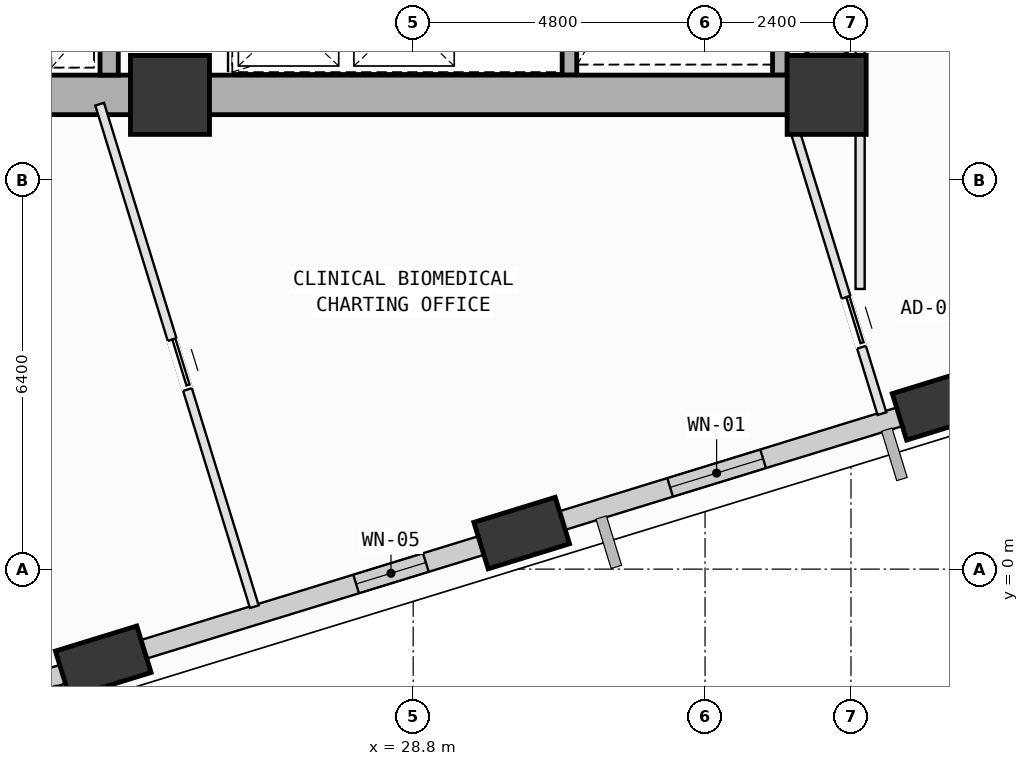
"""IFC4 building model, lengths in metres.
Left out: names, types, materials, properties, quantities, classifications, styles, units other than length and angle.
Written with IfcOpenShell. Run it as: python <this file> out.ifc"""

import sys

from ifc_helpers import new_model, si_unit, direction, frame, frame_2d, origin, origin_2d, place, context, subcontext, project, spatial, rectangle, extrude, element, fill, save


model = new_model("IFC4")
c1 = context("Model", 3, precision=1e-05, world=origin(), true_north=direction((0.0, 1.0)))
c2 = subcontext(c1, "Body", "Model", "MODEL_VIEW")
j1 = project(units=[si_unit("LENGTHUNIT", "METRE"), si_unit("PLANEANGLEUNIT", "RADIAN")], contexts=[c1])
p1 = place(None, origin())
s1 = spatial("IfcSite", under=j1, at=p1, CompositionType="ELEMENT")
p2 = place(p1, origin())
s2 = spatial("IfcBuilding", under=s1, at=p2, CompositionType="ELEMENT")
p3 = place(p2, frame((0.0, 0.0, 96.4)))
s3 = spatial("IfcBuildingStorey", under=s2, at=p3, CompositionType="ELEMENT", Elevation=96.4)
for number, where, z_axis, x_axis in (
    (1, (24.8, 7.8, 0.0), (0.0, 0.0, 1.0), (1.0, 0.0, 0.0)),
    (2, (35.6, 7.8, 0.0), (0.0, 0.0, 1.0), (1.0, 0.0, 0.0)),
):
    element("IfcColumn", number, at=place(p3, frame(where, z_axis=z_axis, x_axis=x_axis)), inside=s3, PredefinedType="COLUMN", context=c2, shape_type="SweptSolid", body=[
        extrude(rectangle(XDim=1.3, YDim=1.3, at=origin_2d()), origin(), (0.0, 0.0, 1.0), 4.0),
    ])
p4 = place(p3, frame((23.703, -1.524, 0.002), z_axis=(0.108738529907, -0.039866748967, 0.993270645112), x_axis=(0.054793722335, 0.997916793661, 0.034054675485)))
e3 = element("IfcColumn", 3, at=p4, inside=s3, PredefinedType="COLUMN", context=c2, shape_type="SweptSolid", body=[
    extrude(rectangle(XDim=1.4, YDim=0.8, at=origin_2d()), origin(), (0.0, 0.0, 1.0), 4.023),
])
p5 = place(p3, frame((30.585, 0.593, 0.002), z_axis=(0.099924278098, -0.011609207492, 0.994927316415), x_axis=(-0.180291978326, 0.983168277463, 0.029579397236)))
e4 = element("IfcColumn", 4, at=p5, inside=s3, PredefinedType="COLUMN", context=c2, shape_type="SweptSolid", body=[
    extrude(rectangle(XDim=1.4, YDim=0.8, at=origin_2d()), origin(), (0.0, 0.0, 1.0), 4.017),
])
p6 = place(p3, frame((37.466, 2.71, 0.002), z_axis=(0.091060551316, 0.016727890188, 0.995704852697), x_axis=(-0.460649221978, 0.887164683089, 0.027223507694)))
e5 = element("IfcColumn", 5, at=p6, inside=s3, PredefinedType="COLUMN", context=c2, shape_type="SweptSolid", body=[
    extrude(rectangle(XDim=1.4, YDim=0.8, at=origin_2d()), origin(), (0.0, 0.0, 1.0), 4.014),
])
p7 = place(p3, frame((23.426, -1.609, 0.0), z_axis=(0.0, 0.0, 1.0), x_axis=(-0.955789110758, -0.294053015213, 0.0)))
e6 = element("IfcWall", 6, at=p7, inside=s3, PredefinedType="SOLIDWALL", context=c2, shape_type="SweptSolid", body=[
    extrude(rectangle(XDim=6.27, YDim=0.32, at=frame_2d((3.135, 0.0))), origin(), (0.0, 0.0, 1.0), 3.165),
])
p8 = place(p7, frame((2.229, 0.0, 0.75)))
e7 = element("IfcOpeningElement", 7, at=p8, cuts=e6, PredefinedType="OPENING", context=c2, shape_type="SweptSolid", body=[
    extrude(rectangle(XDim=1.8, YDim=2.05, at=frame_2d((0.9, 1.025))), frame((0.0, 0.17, 0.0), z_axis=(0.0, -1.0, 0.0), x_axis=(1.0, 0.0, 0.0)), (0.0, 0.0, 1.0), 0.34),
])
p9 = place(p3, frame((30.294, 0.504, 0.0), z_axis=(0.0, 0.0, 1.0), x_axis=(-0.955799327756, -0.294019803859, 0.0)))
e8 = element("IfcWall", 8, at=p9, inside=s3, PredefinedType="SOLIDWALL", context=c2, shape_type="SweptSolid", body=[
    extrude(rectangle(XDim=6.234, YDim=0.32, at=frame_2d((3.117, 0.0))), origin(), (0.0, 0.0, 1.0), 3.165),
])
p10 = place(p9, frame((1.344, 0.0, 0.75)))
e9 = element("IfcOpeningElement", 9, at=p10, cuts=e8, PredefinedType="OPENING", context=c2, shape_type="SweptSolid", body=[
    extrude(rectangle(XDim=1.2, YDim=1.75, at=frame_2d((0.6, 0.875))), frame((0.0, 0.17, 0.0), z_axis=(0.0, -1.0, 0.0), x_axis=(1.0, 0.0, 0.0)), (0.0, 0.0, 1.0), 0.34),
])
p11 = place(p3, frame((37.169, 2.619, 0.0), z_axis=(0.0, 0.0, 1.0), x_axis=(-0.955784954734, -0.294066523602, 0.0)))
e10 = element("IfcWall", 10, at=p11, inside=s3, PredefinedType="SOLIDWALL", context=c2, shape_type="SweptSolid", body=[
    extrude(rectangle(XDim=6.214, YDim=0.32, at=frame_2d((3.107, 0.0))), origin(), (0.0, 0.0, 1.0), 3.165),
])
p12 = place(p11, frame((2.735, 0.0, 0.75)))
e11 = element("IfcOpeningElement", 11, at=p12, cuts=e10, PredefinedType="OPENING", context=c2, shape_type="SweptSolid", body=[
    extrude(rectangle(XDim=1.6, YDim=1.95, at=frame_2d((0.8, 0.975))), frame((0.0, 0.17, 0.0), z_axis=(0.0, -1.0, 0.0), x_axis=(1.0, 0.0, 0.0)), (0.0, 0.0, 1.0), 0.34),
])
for number, where, z_axis, x_axis in (
    (12, (34.83, 15.12, 0.0), (0.0, 0.0, 1.0), (0.0, -1.0, 0.0)),
    (13, (31.37, 8.125, 0.0), (0.0, 0.0, 1.0), (0.0, 1.0, 0.0)),
):
    element("IfcWall", number, at=place(p3, frame(where, z_axis=z_axis, x_axis=x_axis)), inside=s3, PredefinedType="SOLIDWALL", context=c2, shape_type="SweptSolid", body=[
        extrude(rectangle(XDim=6.995, YDim=0.24, at=frame_2d((3.498, 0.0))), origin(), (0.0, 0.0, 1.0), 3.78),
    ])
for number, where, z_axis, x_axis in (
    (14, (14.0, 7.8, 0.0), (0.0, 0.0, 1.0), (1.0, 0.0, 0.0)),
    (15, (24.8, 7.8, 0.0), (0.0, 0.0, 1.0), (1.0, 0.0, 0.0)),
):
    element("IfcWall", number, at=place(p3, frame(where, z_axis=z_axis, x_axis=x_axis)), inside=s3, PredefinedType="SHEAR", context=c2, shape_type="SweptSolid", body=[
        extrude(rectangle(XDim=10.8, YDim=0.65, at=frame_2d((5.4, 0.0))), origin(), (0.0, 0.0, 1.0), 3.78),
    ])
p13 = place(p3, frame((35.6, 7.8, 0.0), z_axis=(0.0, 0.0, 1.0), x_axis=(0.0, 1.0, 0.0)))
e16 = element("IfcWall", 16, at=p13, inside=s3, PredefinedType="SHEAR", context=c2, shape_type="SweptSolid", body=[
    extrude(rectangle(XDim=9.0, YDim=0.65, at=frame_2d((4.5, 0.0))), origin(), (0.0, 0.0, 1.0), 3.78),
])
p14 = place(p3, frame((23.8, 8.125, 0.0), z_axis=(0.0, 0.0, 1.0), x_axis=(0.0, 1.0, 0.0)))
e17 = element("IfcWall", 17, at=p14, inside=s3, PredefinedType="SOLIDWALL", context=c2, shape_type="SweptSolid", body=[
    extrude(rectangle(XDim=2.555, YDim=0.3, at=frame_2d((1.277, 0.0))), origin(), (0.0, 0.0, 1.0), 3.78),
])
p15 = place(p3, frame((23.644, 7.647, 0.0), z_axis=(0.0, 0.0, 1.0), x_axis=(0.294077912985, -0.955781450487, 0.0)))
e18 = element("IfcWall", 18, at=p15, inside=s3, PredefinedType="PARTITIONING", context=c2, shape_type="SweptSolid", body=[
    extrude(rectangle(XDim=8.647, YDim=0.15, at=frame_2d((4.324, 0.0))), origin(), (0.0, 0.0, 1.0), 3.78),
])
p16 = place(p15, frame((4.051, 0.0, 0.0)))
e19 = element("IfcOpeningElement", 19, at=p16, cuts=e18, PredefinedType="OPENING", context=c2, shape_type="SweptSolid", body=[
    extrude(rectangle(XDim=0.86, YDim=2.06, at=frame_2d((0.43, 1.03))), frame((0.0, 0.085, 0.0), z_axis=(0.0, -1.0, 0.0), x_axis=(1.0, 0.0, 0.0)), (0.0, 0.0, 1.0), 0.17),
])
p17 = place(p3, frame((24.402, -1.549, 0.0), z_axis=(0.0, 0.0, 1.0), x_axis=(-0.955695738602, -0.294356340542, 0.0)))
e20 = element("IfcWall", 20, at=p17, inside=s3, PredefinedType="PARTITIONING", context=c2, shape_type="SweptSolid", body=[
    extrude(rectangle(XDim=0.951, YDim=0.15, at=frame_2d((0.476, 0.0))), origin(), (0.0, 0.0, 1.0), 3.165),
])
p18 = place(p3, frame((31.297, 0.572, 0.0), z_axis=(0.0, 0.0, 1.0), x_axis=(-0.955757446398, -0.294155917253, 0.0)))
e21 = element("IfcWall", 21, at=p18, inside=s3, PredefinedType="PARTITIONING", context=c2, shape_type="SweptSolid", body=[
    extrude(rectangle(XDim=0.979, YDim=0.15, at=frame_2d((0.49, 0.0))), origin(), (0.0, 0.0, 1.0), 3.165),
])
p19 = place(p3, frame((34.988, 7.5, 0.0), z_axis=(0.0, 0.0, 1.0), x_axis=(0.294092483167, -0.955776967365, 0.0)))
e22 = element("IfcWall", 22, at=p19, inside=s3, PredefinedType="PARTITIONING", context=c2, shape_type="SweptSolid", body=[
    extrude(rectangle(XDim=5.172, YDim=0.15, at=frame_2d((2.586, 0.0))), origin(), (0.0, 0.0, 1.0), 3.78),
])
p20 = place(p19, frame((3.169, 0.0, 0.0)))
e23 = element("IfcOpeningElement", 23, at=p20, cuts=e22, PredefinedType="OPENING", context=c2, shape_type="SweptSolid", body=[
    extrude(rectangle(XDim=0.86, YDim=2.06, at=frame_2d((0.43, 1.03))), frame((0.0, 0.085, 0.0), z_axis=(0.0, -1.0, 0.0), x_axis=(1.0, 0.0, 0.0)), (0.0, 0.0, 1.0), 0.17),
])
p21 = place(p3, frame((36.15, 4.608, 0.0), z_axis=(0.0, 0.0, 1.0), x_axis=(0.0, 1.0, 0.0)))
e24 = element("IfcWall", 24, at=p21, inside=s3, PredefinedType="PARTITIONING", context=c2, shape_type="SweptSolid", body=[
    extrude(rectangle(XDim=10.652, YDim=0.15, at=frame_2d((5.326, 0.0))), origin(), (0.0, 0.0, 1.0), 3.78),
])
p22 = place(p3, frame((38.184, 2.69, 0.0), z_axis=(0.0, 0.0, 1.0), x_axis=(-0.95597043772, -0.293462982684, 0.0)))
e25 = element("IfcWall", 25, at=p22, inside=s3, PredefinedType="PARTITIONING", context=c2, shape_type="SweptSolid", body=[
    extrude(rectangle(XDim=0.992, YDim=0.15, at=frame_2d((0.496, 0.0))), origin(), (0.0, 0.0, 1.0), 3.165),
])
p23 = place(p10, origin())
e26 = element("IfcWindow", 26, at=p23, inside=s3, PartitioningType="SINGLE_PANEL", PredefinedType="WINDOW", context=c2, shape_type="SweptSolid", body=[
    extrude(rectangle(XDim=1.2, YDim=1.75, at=frame_2d((0.6, 0.875))), frame((0.0, 0.03, 0.0), z_axis=(0.0, -1.0, 0.0), x_axis=(1.0, 0.0, 0.0)), (0.0, 0.0, 1.0), 0.06),
])
fill(e9, e26)
p24 = place(p12, origin())
e27 = element("IfcWindow", 27, at=p24, inside=s3, PartitioningType="SINGLE_PANEL", PredefinedType="WINDOW", context=c2, shape_type="SweptSolid", body=[
    extrude(rectangle(XDim=1.6, YDim=1.95, at=frame_2d((0.8, 0.975))), frame((0.0, 0.03, 0.0), z_axis=(0.0, -1.0, 0.0), x_axis=(1.0, 0.0, 0.0)), (0.0, 0.0, 1.0), 0.06),
])
fill(e11, e27)
p25 = place(p20, origin())
e28 = element("IfcDoor", 28, at=p25, inside=s3, OperationType="SLIDING_TO_LEFT", PredefinedType="DOOR", context=c2, shape_type="SweptSolid", body=[
    extrude(rectangle(XDim=0.86, YDim=2.06, at=frame_2d((0.43, 1.03))), frame((0.0, 0.025, 0.0), z_axis=(0.0, -1.0, 0.0), x_axis=(1.0, 0.0, 0.0)), (0.0, 0.0, 1.0), 0.05),
])
fill(e23, e28)
p26 = place(p16, origin())
e29 = element("IfcDoor", 29, at=p26, inside=s3, OperationType="SLIDING_TO_LEFT", PredefinedType="DOOR", context=c2, shape_type="SweptSolid", body=[
    extrude(rectangle(XDim=0.86, YDim=2.06, at=frame_2d((0.43, 1.03))), frame((0.0, 0.025, 0.0), z_axis=(0.0, -1.0, 0.0), x_axis=(1.0, 0.0, 0.0)), (0.0, 0.0, 1.0), 0.05),
])
fill(e19, e29)
save(model, sys.argv[1])
